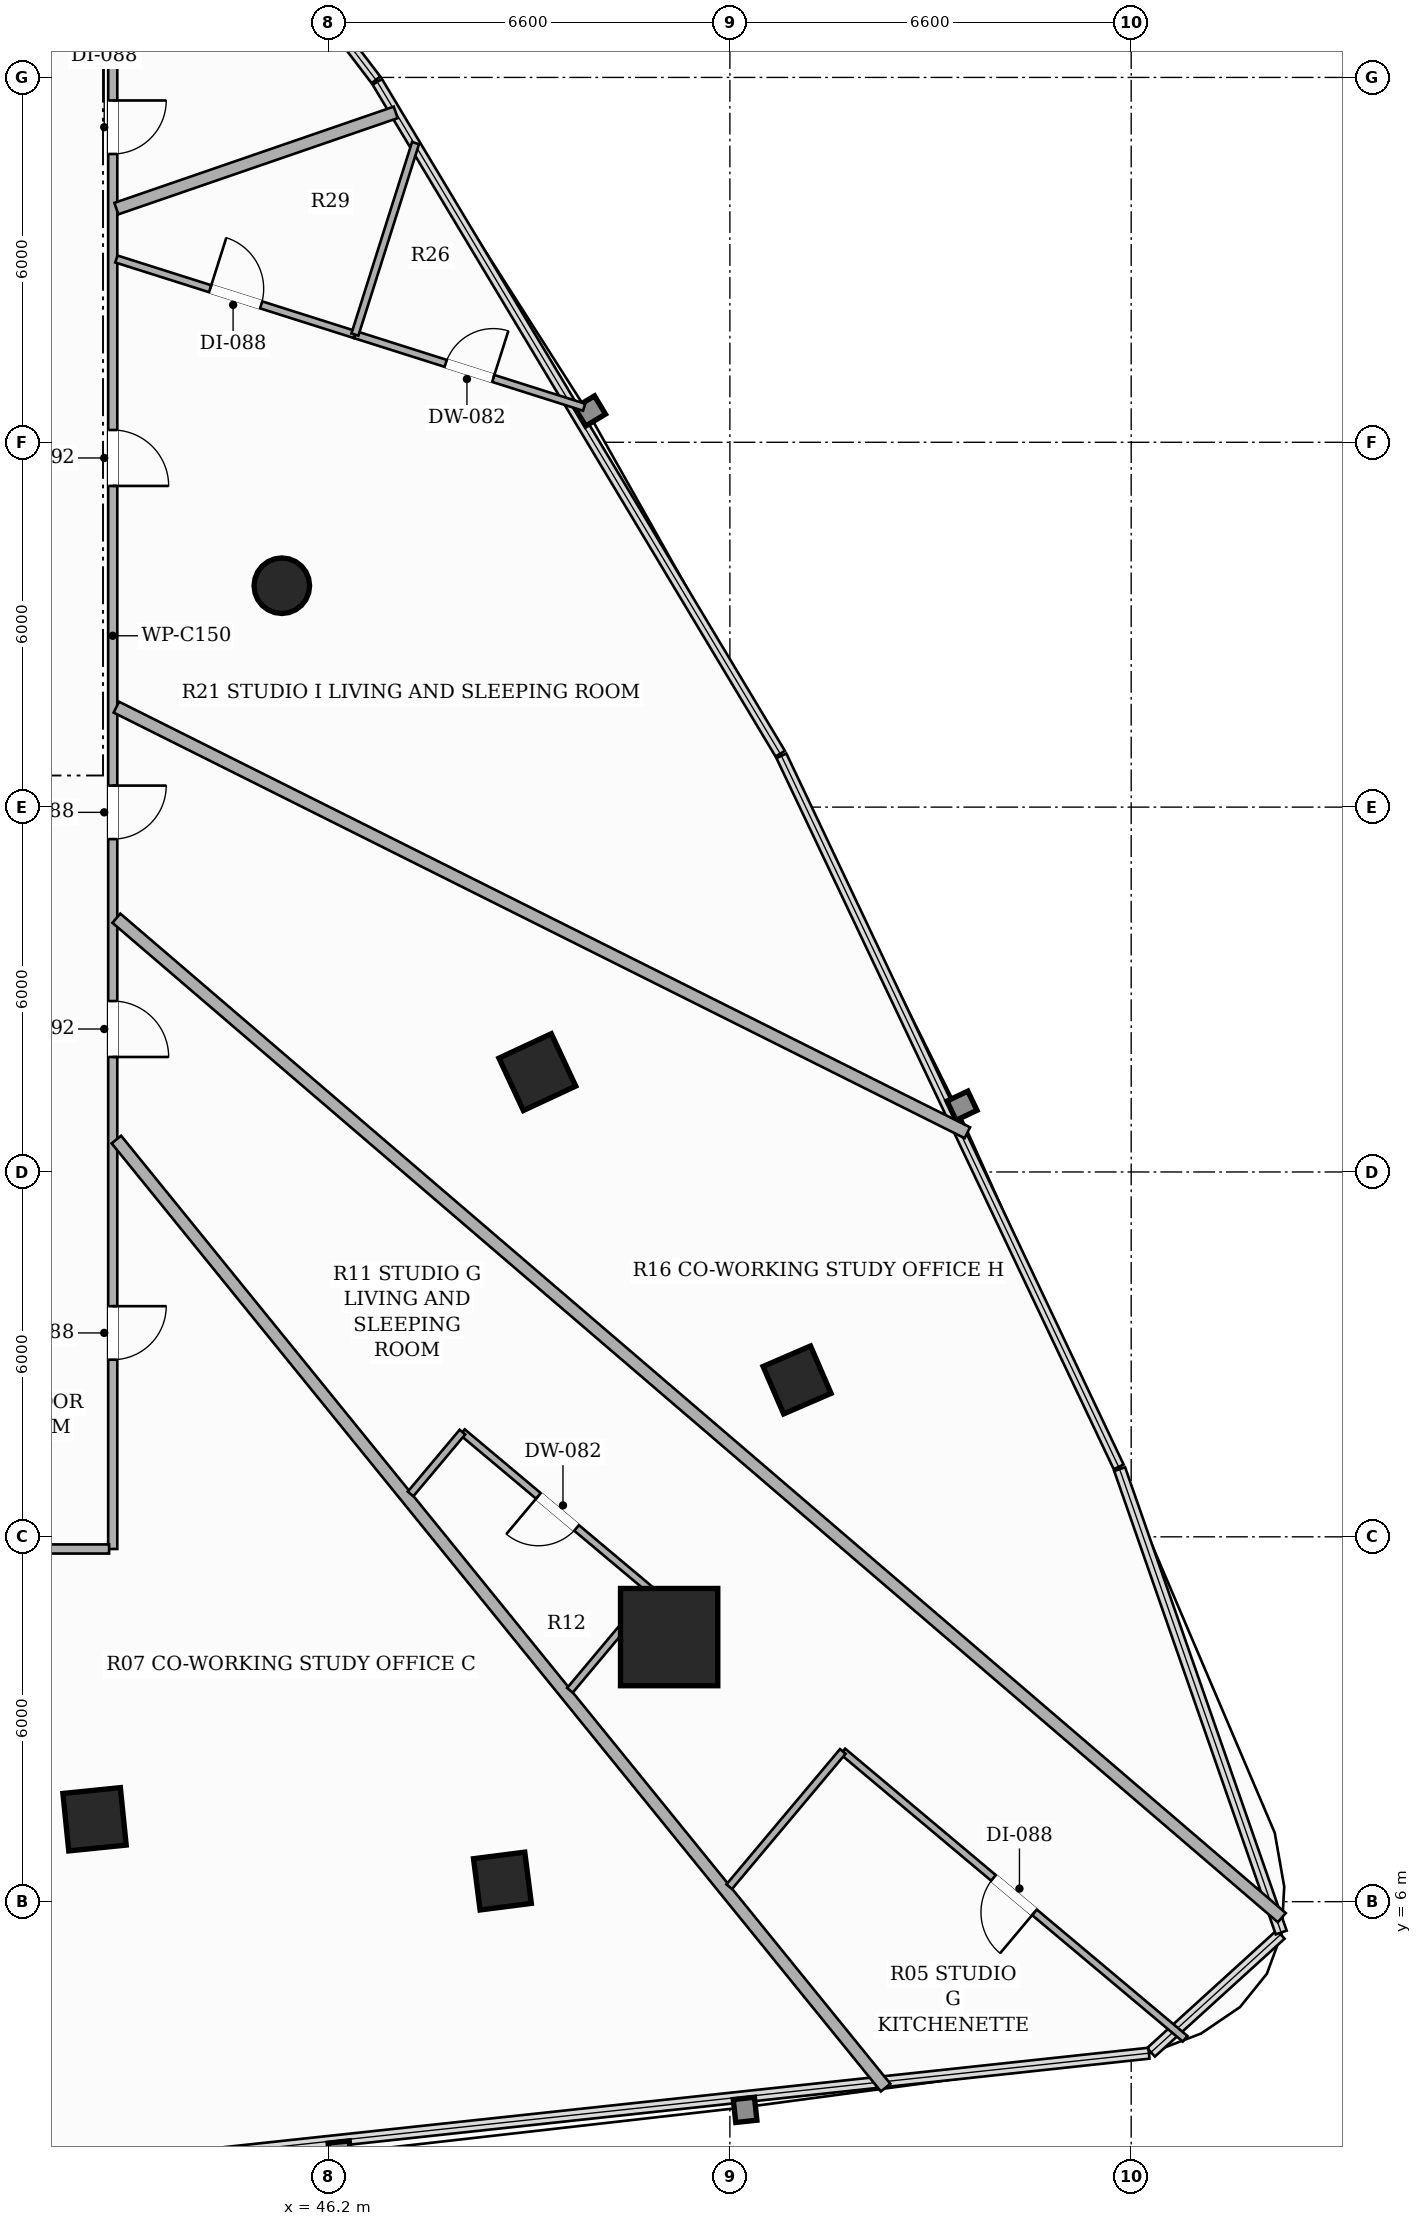
"""IFC4 building model, lengths in metres.
Left out: names, types, materials, properties, quantities, classifications, styles, units other than length and angle.
Written with IfcOpenShell. Run it as: python <this file> out.ifc"""

import sys

from ifc_helpers import new_model, si_unit, direction, frame, frame_2d, origin, origin_2d, place, context, subcontext, project, spatial, rectangle, hollow_rectangle, hollow_circle, extrude, element, fill, save


model = new_model("IFC4")
c1 = context("Model", 3, precision=1e-05, world=origin(), true_north=direction((0.0, 1.0)))
c2 = subcontext(c1, "Body", "Model", "MODEL_VIEW")
j1 = project(units=[si_unit("LENGTHUNIT", "METRE"), si_unit("PLANEANGLEUNIT", "RADIAN")], contexts=[c1])
p1 = place(None, origin())
s1 = spatial("IfcSite", under=j1, at=p1, CompositionType="ELEMENT")
p2 = place(p1, origin())
s2 = spatial("IfcBuilding", under=s1, at=p2, CompositionType="ELEMENT")
p3 = place(p2, frame((0.0, 0.0, 33.5)))
s3 = spatial("IfcBuildingStorey", under=s2, at=p3, CompositionType="ELEMENT", Elevation=33.5)
p4 = place(p3, frame((51.801, 10.351, 0.0), z_axis=(0.0, 0.0, 1.0), x_axis=(1.0, 0.0, 0.0)))
e1 = element("IfcColumn", 1, at=p4, inside=s3, PredefinedType="COLUMN", context=c2, shape_type="SweptSolid", body=[
    extrude(hollow_rectangle(XDim=1.6, YDim=1.6, WallThickness=0.05, at=origin_2d()), origin(), (0.0, 0.0, 1.0), 3.3),
])
for number, where, z_axis, x_axis in (
    (2, (42.351, 7.355, 0.0), (0.0, 0.0, 1.0), (0.995, 0.101, 0.0)),
    (3, (49.633, 19.642, 0.0), (0.0, 0.0, 1.0), (-0.423, 0.906, 0.0)),
):
    element("IfcColumn", number, at=place(p3, frame(where, z_axis=z_axis, x_axis=x_axis)), inside=s3, PredefinedType="COLUMN", context=c2, shape_type="SweptSolid", body=[
        extrude(hollow_rectangle(XDim=0.95, YDim=0.95, WallThickness=0.032, at=origin_2d()), origin(), (0.0, 0.0, 1.0), 3.3),
    ])
p5 = place(p3, frame((45.431, 27.641, 0.0), z_axis=(0.0, 0.0, 1.0), x_axis=(1.0, 0.0, 0.0)))
e4 = element("IfcColumn", 4, at=p5, inside=s3, PredefinedType="COLUMN", context=c2, shape_type="SweptSolid", body=[
    extrude(hollow_circle(Radius=0.457, WallThickness=0.025, at=origin_2d()), origin(), (0.0, 0.0, 1.0), 3.3),
])
for number, where, z_axis, x_axis in (
    (5, (49.059, 6.339, 0.0), (0.0, 0.0, 1.0), (0.992, 0.127, 0.0)),
    (6, (53.905, 14.58, 0.0), (0.0, 0.0, 1.0), (-0.397, 0.918, 0.0)),
):
    element("IfcColumn", number, at=place(p3, frame(where, z_axis=z_axis, x_axis=x_axis)), inside=s3, PredefinedType="COLUMN", context=c2, shape_type="SweptSolid", body=[
        extrude(hollow_rectangle(XDim=0.85, YDim=0.85, WallThickness=0.028, at=origin_2d()), origin(), (0.0, 0.0, 1.0), 3.3),
    ])
p6 = place(p3, frame((42.65, 36.84, 0.0), z_axis=(0.0, 0.0, 1.0), x_axis=(0.0, -1.0, 0.0)))
e7 = element("IfcWall", 7, at=p6, inside=s3, PredefinedType="PARTITIONING", context=c2, shape_type="SweptSolid", body=[
    extrude(rectangle(XDim=25.04, YDim=0.15, at=frame_2d((12.52, 0.0))), origin(), (0.0, 0.0, 1.0), 2.413),
])
p7 = place(p6, frame((1.219, 0.0, 0.0)))
e8 = element("IfcOpeningElement", 8, at=p7, cuts=e7, PredefinedType="OPENING", context=c2, shape_type="SweptSolid", body=[
    extrude(rectangle(XDim=0.88, YDim=2.1, at=frame_2d((0.44, 1.05))), frame((0.0, 0.085, 0.0), z_axis=(0.0, -1.0, 0.0), x_axis=(1.0, 0.0, 0.0)), (0.0, 0.0, 1.0), 0.17),
])
p8 = place(p6, frame((21.047, 0.0, 0.0)))
e9 = element("IfcOpeningElement", 9, at=p8, cuts=e7, PredefinedType="OPENING", context=c2, shape_type="SweptSolid", body=[
    extrude(rectangle(XDim=0.88, YDim=2.1, at=frame_2d((0.44, 1.05))), frame((0.0, 0.085, 0.0), z_axis=(0.0, -1.0, 0.0), x_axis=(1.0, 0.0, 0.0)), (0.0, 0.0, 1.0), 0.17),
])
p9 = place(p6, frame((16.029, 0.0, 0.0)))
e10 = element("IfcOpeningElement", 10, at=p9, cuts=e7, PredefinedType="OPENING", context=c2, shape_type="SweptSolid", body=[
    extrude(rectangle(XDim=0.92, YDim=2.15, at=frame_2d((0.46, 1.075))), frame((0.0, 0.085, 0.0), z_axis=(0.0, -1.0, 0.0), x_axis=(1.0, 0.0, 0.0)), (0.0, 0.0, 1.0), 0.17),
])
p10 = place(p6, frame((12.486, 0.0, 0.0)))
e11 = element("IfcOpeningElement", 11, at=p10, cuts=e7, PredefinedType="OPENING", context=c2, shape_type="SweptSolid", body=[
    extrude(rectangle(XDim=0.88, YDim=2.1, at=frame_2d((0.44, 1.05))), frame((0.0, 0.085, 0.0), z_axis=(0.0, -1.0, 0.0), x_axis=(1.0, 0.0, 0.0)), (0.0, 0.0, 1.0), 0.17),
])
p11 = place(p6, frame((6.638, 0.0, 0.0)))
e12 = element("IfcOpeningElement", 12, at=p11, cuts=e7, PredefinedType="OPENING", context=c2, shape_type="SweptSolid", body=[
    extrude(rectangle(XDim=0.92, YDim=2.15, at=frame_2d((0.46, 1.075))), frame((0.0, 0.085, 0.0), z_axis=(0.0, -1.0, 0.0), x_axis=(1.0, 0.0, 0.0)), (0.0, 0.0, 1.0), 0.17),
])
p12 = place(p3, frame((42.59, 11.8, 0.0), z_axis=(0.0, 0.0, 1.0), x_axis=(-1.0, 0.0, 0.0)))
e13 = element("IfcWall", 13, at=p12, inside=s3, PredefinedType="PARTITIONING", context=c2, shape_type="SweptSolid", body=[
    extrude(rectangle(XDim=19.24, YDim=0.15, at=frame_2d((9.62, 0.0))), origin(), (0.0, 0.0, 1.0), 2.669),
])
p13 = place(p12, frame((10.462, 0.0, 0.0)))
e14 = element("IfcOpeningElement", 14, at=p13, cuts=e13, PredefinedType="OPENING", context=c2, shape_type="SweptSolid", body=[
    extrude(rectangle(XDim=0.92, YDim=2.15, at=frame_2d((0.46, 1.075))), frame((0.0, 0.085, 0.0), z_axis=(0.0, -1.0, 0.0), x_axis=(1.0, 0.0, 0.0)), (0.0, 0.0, 1.0), 0.17),
])
p14 = place(p3, frame((47.304, 35.425, 0.0), z_axis=(0.0, 0.0, 1.0), x_axis=(-0.945506397197, -0.325603520956, 0.0)))
e15 = element("IfcWall", 15, at=p14, inside=s3, PredefinedType="PARTITIONING", context=c2, shape_type="SweptSolid", body=[
    extrude(rectangle(XDim=4.859, YDim=0.2, at=frame_2d((2.429, 0.0))), origin(), (0.0, 0.0, 1.0), 3.06),
])
p15 = place(p3, frame((42.71, 18.533, 0.0), z_axis=(0.0, 0.0, 1.0), x_axis=(0.630093983448, -0.776518880661, 0.0)))
e16 = element("IfcWall", 16, at=p15, inside=s3, PredefinedType="PARTITIONING", context=c2, shape_type="SweptSolid", body=[
    extrude(rectangle(XDim=20.078, YDim=0.2, at=frame_2d((10.039, 0.0))), origin(), (0.0, 0.0, 1.0), 2.413),
])
p16 = place(p3, frame((42.71, 22.173, 0.0), z_axis=(0.0, 0.0, 1.0), x_axis=(0.759115981911, -0.650955394791, 0.0)))
e17 = element("IfcWall", 17, at=p16, inside=s3, PredefinedType="PARTITIONING", context=c2, shape_type="SweptSolid", body=[
    extrude(rectangle(XDim=25.249, YDim=0.2, at=frame_2d((12.625, 0.0))), origin(), (0.0, 0.0, 1.0), 2.413),
])
p17 = place(p3, frame((42.71, 25.644, 0.0), z_axis=(0.0, 0.0, 1.0), x_axis=(0.894389742198, -0.447288485265, 0.0)))
e18 = element("IfcWall", 18, at=p17, inside=s3, PredefinedType="PARTITIONING", context=c2, shape_type="SweptSolid", body=[
    extrude(rectangle(XDim=15.648, YDim=0.2, at=frame_2d((7.824, 0.0))), origin(), (0.0, 0.0, 1.0), 2.413),
])
p18 = place(p3, frame((50.169, 9.476, 0.0), z_axis=(0.0, 0.0, 1.0), x_axis=(0.642802339764, 0.766032082875, 0.0)))
e19 = element("IfcWall", 19, at=p18, inside=s3, PredefinedType="PARTITIONING", context=c2, shape_type="SweptSolid", body=[
    extrude(rectangle(XDim=2.116, YDim=0.12, at=frame_2d((1.058, 0.0))), origin(), (0.0, 0.0, 1.0), 2.413),
])
p19 = place(p3, frame((51.529, 11.097, 0.0), z_axis=(0.0, 0.0, 1.0), x_axis=(-0.766026296222, 0.642809235696, 0.0)))
e20 = element("IfcWall", 20, at=p19, inside=s3, PredefinedType="PARTITIONING", context=c2, shape_type="SweptSolid", body=[
    extrude(rectangle(XDim=4.084, YDim=0.12, at=frame_2d((2.042, 0.0))), origin(), (0.0, 0.0, 1.0), 2.413),
])
p20 = place(p19, frame((1.632, 0.0, 0.0)))
e21 = element("IfcOpeningElement", 21, at=p20, cuts=e20, PredefinedType="OPENING", context=c2, shape_type="SweptSolid", body=[
    extrude(rectangle(XDim=0.82, YDim=2.1, at=frame_2d((0.41, 1.05))), frame((0.0, 0.07, 0.0), z_axis=(0.0, -1.0, 0.0), x_axis=(1.0, 0.0, 0.0)), (0.0, 0.0, 1.0), 0.14),
])
p21 = place(p3, frame((48.401, 13.722, 0.0), z_axis=(0.0, 0.0, 1.0), x_axis=(-0.642587875402, -0.76621199572, 0.0)))
e22 = element("IfcWall", 22, at=p21, inside=s3, PredefinedType="PARTITIONING", context=c2, shape_type="SweptSolid", body=[
    extrude(rectangle(XDim=1.327, YDim=0.12, at=frame_2d((0.664, 0.0))), origin(), (0.0, 0.0, 1.0), 3.06),
])
p22 = place(p3, frame((60.287, 3.745, 0.0), z_axis=(0.0, 0.0, 1.0), x_axis=(-0.765937745649, 0.642914745351, 0.0)))
e23 = element("IfcWall", 23, at=p22, inside=s3, PredefinedType="PARTITIONING", context=c2, shape_type="SweptSolid", body=[
    extrude(rectangle(XDim=7.351, YDim=0.12, at=frame_2d((3.675, 0.0))), origin(), (0.0, 0.0, 1.0), 2.619),
])
p23 = place(p22, frame((3.235, 0.0, 0.0)))
e24 = element("IfcOpeningElement", 24, at=p23, cuts=e23, PredefinedType="OPENING", context=c2, shape_type="SweptSolid", body=[
    extrude(rectangle(XDim=0.88, YDim=2.1, at=frame_2d((0.44, 1.05))), frame((0.0, 0.07, 0.0), z_axis=(0.0, -1.0, 0.0), x_axis=(1.0, 0.0, 0.0)), (0.0, 0.0, 1.0), 0.14),
])
p24 = place(p3, frame((54.657, 8.471, 0.0), z_axis=(0.0, 0.0, 1.0), x_axis=(-0.6429989132, -0.765867088746, 0.0)))
e25 = element("IfcWall", 25, at=p24, inside=s3, PredefinedType="PARTITIONING", context=c2, shape_type="SweptSolid", body=[
    extrude(rectangle(XDim=2.905, YDim=0.12, at=frame_2d((1.453, 0.0))), origin(), (0.0, 0.0, 1.0), 3.06),
])
p25 = place(p3, frame((46.633, 31.771, 0.0), z_axis=(0.0, 0.0, 1.0), x_axis=(0.953252758263, -0.302174087016, 0.0)))
e26 = element("IfcWall", 26, at=p25, inside=s3, PredefinedType="PARTITIONING", context=c2, shape_type="SweptSolid", body=[
    extrude(rectangle(XDim=3.955, YDim=0.12, at=frame_2d((1.978, 0.0))), origin(), (0.0, 0.0, 1.0), 3.06),
])
p26 = place(p25, frame((1.567, 0.0, 0.0)))
e27 = element("IfcOpeningElement", 27, at=p26, cuts=e26, PredefinedType="OPENING", context=c2, shape_type="SweptSolid", body=[
    extrude(rectangle(XDim=0.82, YDim=2.1, at=frame_2d((0.41, 1.05))), frame((0.0, 0.07, 0.0), z_axis=(0.0, -1.0, 0.0), x_axis=(1.0, 0.0, 0.0)), (0.0, 0.0, 1.0), 0.14),
])
p27 = place(p3, frame((42.71, 33.014, 0.0), z_axis=(0.0, 0.0, 1.0), x_axis=(0.953299814988, -0.302025599484, 0.0)))
e28 = element("IfcWall", 28, at=p27, inside=s3, PredefinedType="PARTITIONING", context=c2, shape_type="SweptSolid", body=[
    extrude(rectangle(XDim=4.115, YDim=0.12, at=frame_2d((2.058, 0.0))), origin(), (0.0, 0.0, 1.0), 3.06),
])
p28 = place(p27, frame((1.618, 0.0, 0.0)))
e29 = element("IfcOpeningElement", 29, at=p28, cuts=e28, PredefinedType="OPENING", context=c2, shape_type="SweptSolid", body=[
    extrude(rectangle(XDim=0.88, YDim=2.1, at=frame_2d((0.44, 1.05))), frame((0.0, 0.07, 0.0), z_axis=(0.0, -1.0, 0.0), x_axis=(1.0, 0.0, 0.0)), (0.0, 0.0, 1.0), 0.14),
])
p29 = place(p3, frame((46.633, 31.771, 0.0), z_axis=(0.0, 0.0, 1.0), x_axis=(0.301799891186, 0.953371294764, 0.0)))
e30 = element("IfcWall", 30, at=p29, inside=s3, PredefinedType="PARTITIONING", context=c2, shape_type="SweptSolid", body=[
    extrude(rectangle(XDim=3.303, YDim=0.12, at=frame_2d((1.651, 0.0))), origin(), (0.0, 0.0, 1.0), 3.06),
])
p30 = place(p7, origin())
e31 = element("IfcDoor", 31, at=p30, inside=s3, OperationType="SINGLE_SWING_LEFT", PredefinedType="DOOR", context=c2, shape_type="SweptSolid", body=[
    extrude(rectangle(XDim=0.88, YDim=2.1, at=frame_2d((0.44, 1.05))), frame((0.0, 0.025, 0.0), z_axis=(0.0, -1.0, 0.0), x_axis=(1.0, 0.0, 0.0)), (0.0, 0.0, 1.0), 0.05),
])
fill(e8, e31)
p31 = place(p8, origin())
e32 = element("IfcDoor", 32, at=p31, inside=s3, OperationType="SINGLE_SWING_LEFT", PredefinedType="DOOR", context=c2, shape_type="SweptSolid", body=[
    extrude(rectangle(XDim=0.88, YDim=2.1, at=frame_2d((0.44, 1.05))), frame((0.0, 0.025, 0.0), z_axis=(0.0, -1.0, 0.0), x_axis=(1.0, 0.0, 0.0)), (0.0, 0.0, 1.0), 0.05),
])
fill(e9, e32)
p32 = place(p9, origin())
e33 = element("IfcDoor", 33, at=p32, inside=s3, OperationType="SINGLE_SWING_RIGHT", PredefinedType="DOOR", context=c2, shape_type="SweptSolid", body=[
    extrude(rectangle(XDim=0.92, YDim=2.15, at=frame_2d((0.46, 1.075))), frame((0.0, 0.025, 0.0), z_axis=(0.0, -1.0, 0.0), x_axis=(1.0, 0.0, 0.0)), (0.0, 0.0, 1.0), 0.05),
])
fill(e10, e33)
p33 = place(p20, origin())
e34 = element("IfcDoor", 34, at=p33, inside=s3, OperationType="SINGLE_SWING_RIGHT", PredefinedType="DOOR", context=c2, shape_type="SweptSolid", body=[
    extrude(rectangle(XDim=0.82, YDim=2.1, at=frame_2d((0.41, 1.05))), frame((0.0, 0.025, 0.0), z_axis=(0.0, -1.0, 0.0), x_axis=(1.0, 0.0, 0.0)), (0.0, 0.0, 1.0), 0.05),
])
fill(e21, e34)
p34 = place(p23, origin())
e35 = element("IfcDoor", 35, at=p34, inside=s3, OperationType="SINGLE_SWING_LEFT", PredefinedType="DOOR", context=c2, shape_type="SweptSolid", body=[
    extrude(rectangle(XDim=0.88, YDim=2.1, at=frame_2d((0.44, 1.05))), frame((0.0, 0.025, 0.0), z_axis=(0.0, -1.0, 0.0), x_axis=(1.0, 0.0, 0.0)), (0.0, 0.0, 1.0), 0.05),
])
fill(e24, e35)
p35 = place(p10, origin())
e36 = element("IfcDoor", 36, at=p35, inside=s3, OperationType="SINGLE_SWING_LEFT", PredefinedType="DOOR", context=c2, shape_type="SweptSolid", body=[
    extrude(rectangle(XDim=0.88, YDim=2.1, at=frame_2d((0.44, 1.05))), frame((0.0, 0.025, 0.0), z_axis=(0.0, -1.0, 0.0), x_axis=(1.0, 0.0, 0.0)), (0.0, 0.0, 1.0), 0.05),
])
fill(e11, e36)
p36 = place(p11, origin())
e37 = element("IfcDoor", 37, at=p36, inside=s3, OperationType="SINGLE_SWING_RIGHT", PredefinedType="DOOR", context=c2, shape_type="SweptSolid", body=[
    extrude(rectangle(XDim=0.92, YDim=2.15, at=frame_2d((0.46, 1.075))), frame((0.0, 0.025, 0.0), z_axis=(0.0, -1.0, 0.0), x_axis=(1.0, 0.0, 0.0)), (0.0, 0.0, 1.0), 0.05),
])
fill(e12, e37)
p37 = place(p26, origin())
e38 = element("IfcDoor", 38, at=p37, inside=s3, OperationType="SINGLE_SWING_RIGHT", PredefinedType="DOOR", context=c2, shape_type="SweptSolid", body=[
    extrude(rectangle(XDim=0.82, YDim=2.1, at=frame_2d((0.41, 1.05))), frame((0.0, 0.025, 0.0), z_axis=(0.0, -1.0, 0.0), x_axis=(1.0, 0.0, 0.0)), (0.0, 0.0, 1.0), 0.05),
])
fill(e27, e38)
p38 = place(p28, origin())
e39 = element("IfcDoor", 39, at=p38, inside=s3, OperationType="SINGLE_SWING_LEFT", PredefinedType="DOOR", context=c2, shape_type="SweptSolid", body=[
    extrude(rectangle(XDim=0.88, YDim=2.1, at=frame_2d((0.44, 1.05))), frame((0.0, 0.025, 0.0), z_axis=(0.0, -1.0, 0.0), x_axis=(1.0, 0.0, 0.0)), (0.0, 0.0, 1.0), 0.05),
])
fill(e29, e39)
save(model, sys.argv[1])
